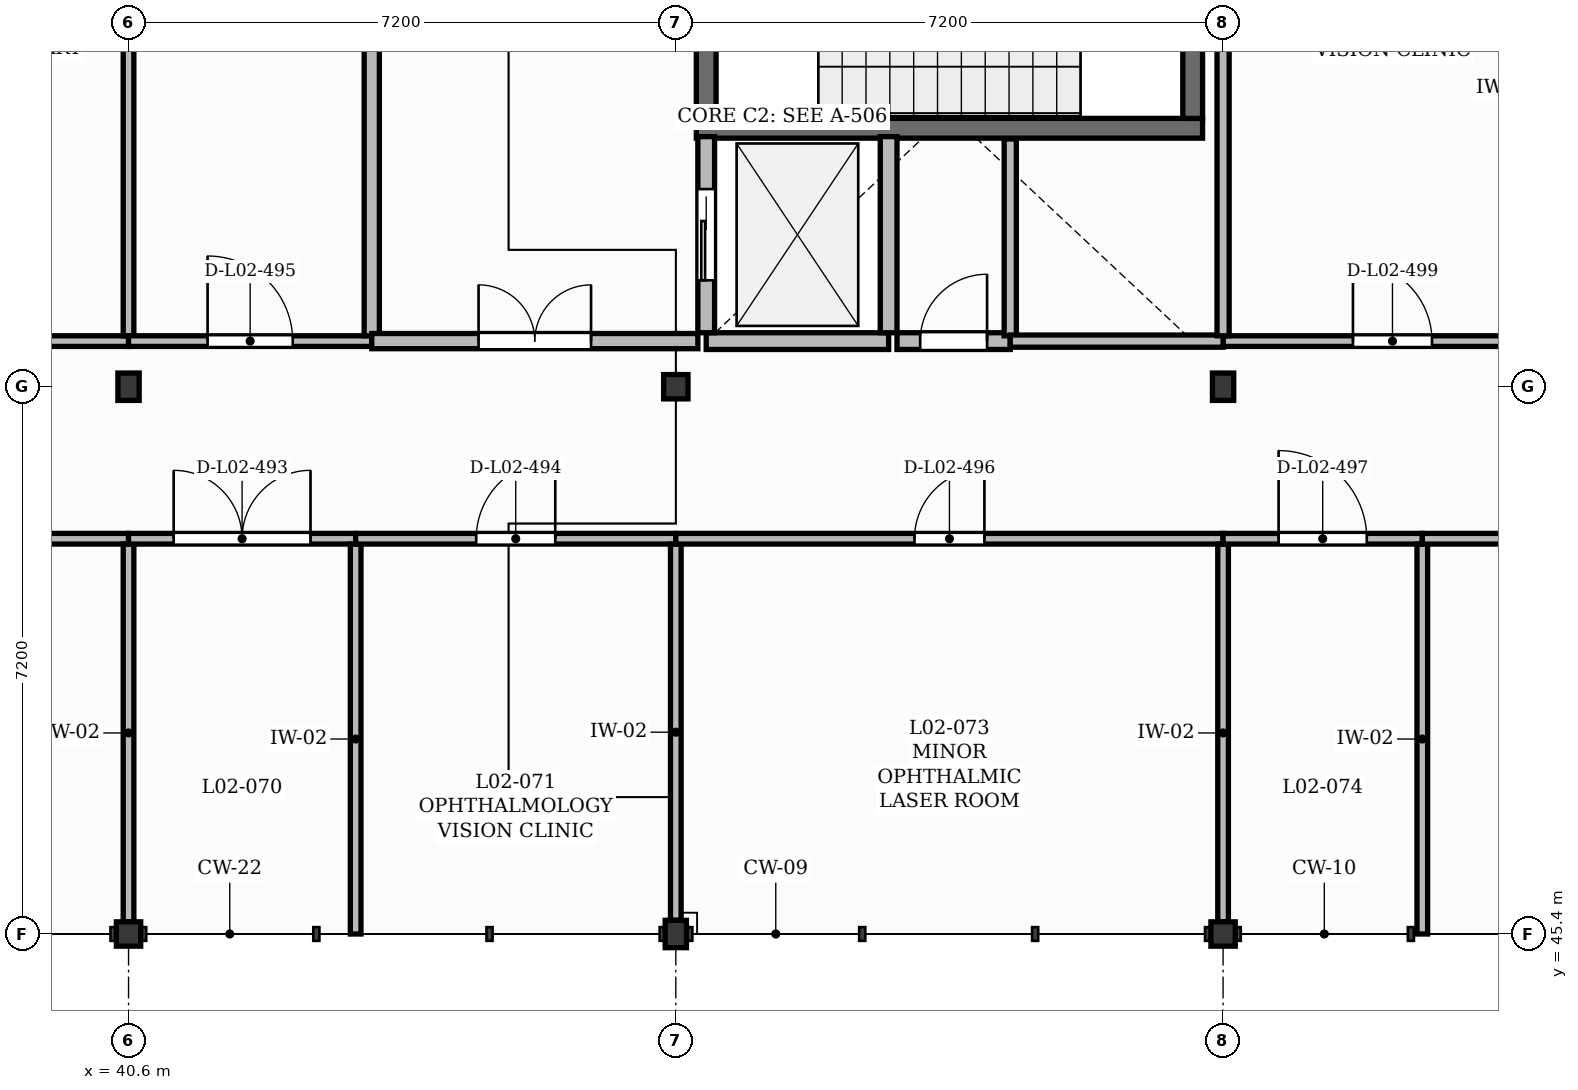
"""IFC4 building model, lengths in metres.
Left out: names, types, materials, properties, quantities, classifications, styles, units other than length and angle.
Written with IfcOpenShell. Run it as: python <this file> out.ifc"""

import sys

from ifc_helpers import new_model, si_unit, direction, frame, frame_2d, origin, origin_2d, place, context, subcontext, project, spatial, rectangle, extrude, element, fill, save


model = new_model("IFC4")
c1 = context("Model", 3, precision=1e-05, world=origin(), true_north=direction((0.0, 1.0)))
c2 = subcontext(c1, "Body", "Model", "MODEL_VIEW")
j1 = project(units=[si_unit("LENGTHUNIT", "METRE"), si_unit("PLANEANGLEUNIT", "RADIAN")], contexts=[c1])
p1 = place(None, origin())
s1 = spatial("IfcSite", under=j1, at=p1, CompositionType="ELEMENT")
p2 = place(p1, origin())
s2 = spatial("IfcBuilding", under=s1, at=p2, CompositionType="ELEMENT")
p3 = place(p2, frame((0.0, 0.0, 9.0)))
s3 = spatial("IfcBuildingStorey", under=s2, at=p3, CompositionType="ELEMENT", Elevation=9.0)
p4 = place(p3, frame((40.6, 45.4, 0.0), z_axis=(0.0, 0.0, 1.0), x_axis=(1.0, 0.0, 0.0)))
e1 = element("IfcColumn", 1, at=p4, inside=s3, PredefinedType="COLUMN", context=c2, shape_type="SweptSolid", body=[
    extrude(rectangle(XDim=0.32, YDim=0.32, at=origin_2d()), origin(), (0.0, 0.0, 1.0), 3.99),
])
for number, where, z_axis, x_axis in (
    (2, (40.6, 52.6, 0.0), (0.0, 0.0, 1.0), (1.0, 0.0, 0.0)),
    (3, (47.8, 45.4, 0.0), (0.0, 0.0, 1.0), (1.0, 0.0, 0.0)),
):
    element("IfcColumn", number, at=place(p3, frame(where, z_axis=z_axis, x_axis=x_axis)), inside=s3, PredefinedType="COLUMN", context=c2, shape_type="SweptSolid", body=[
        extrude(rectangle(XDim=0.28, YDim=0.36, at=origin_2d()), origin(), (0.0, 0.0, 1.0), 3.99),
    ])
for number, where, z_axis, x_axis in (
    (4, (47.8, 52.6, 0.0), (0.0, 0.0, 1.0), (1.0, 0.0, 0.0)),
    (5, (55.0, 45.4, 0.0), (0.0, 0.0, 1.0), (1.0, 0.0, 0.0)),
):
    element("IfcColumn", number, at=place(p3, frame(where, z_axis=z_axis, x_axis=x_axis)), inside=s3, PredefinedType="COLUMN", context=c2, shape_type="SweptSolid", body=[
        extrude(rectangle(XDim=0.32, YDim=0.32, at=origin_2d()), origin(), (0.0, 0.0, 1.0), 3.99),
    ])
p5 = place(p3, frame((55.0, 52.6, 0.0), z_axis=(0.0, 0.0, 1.0), x_axis=(1.0, 0.0, 0.0)))
e6 = element("IfcColumn", 6, at=p5, inside=s3, PredefinedType="COLUMN", context=c2, shape_type="SweptSolid", body=[
    extrude(rectangle(XDim=0.28, YDim=0.36, at=origin_2d()), origin(), (0.0, 0.0, 1.0), 3.99),
])
p6 = place(p3, frame((48.07, 56.0, 0.0), z_axis=(0.0, 0.0, 1.0), x_axis=(1.0, 0.0, 0.0)))
e7 = element("IfcWall", 7, at=p6, inside=s3, PredefinedType="SHEAR", context=c2, shape_type="SweptSolid", body=[
    extrude(rectangle(XDim=6.66, YDim=0.26, at=frame_2d((3.33, 0.0))), origin(), (0.0, 0.0, 1.0), 3.95),
])
p7 = place(p3, frame((48.2, 56.13, 0.0), z_axis=(0.0, 0.0, 1.0), x_axis=(0.0, 1.0, 0.0)))
e8 = element("IfcWall", 8, at=p7, inside=s3, PredefinedType="SHEAR", context=c2, shape_type="SweptSolid", body=[
    extrude(rectangle(XDim=2.94, YDim=0.26, at=frame_2d((1.47, 0.0))), origin(), (0.0, 0.0, 1.0), 3.95),
])
p8 = place(p7, frame((0.91, 0.0, 0.0)))
e9 = element("IfcOpeningElement", 9, at=p8, cuts=e8, PredefinedType="OPENING", context=c2, shape_type="SweptSolid", body=[
    extrude(rectangle(XDim=1.12, YDim=2.1, at=frame_2d((0.56, 1.05))), frame((0.0, 0.14, 0.0), z_axis=(0.0, -1.0, 0.0), x_axis=(1.0, 0.0, 0.0)), (0.0, 0.0, 1.0), 0.28),
])
p9 = place(p3, frame((54.6, 56.13, 0.0), z_axis=(0.0, 0.0, 1.0), x_axis=(0.0, 1.0, 0.0)))
e10 = element("IfcWall", 10, at=p9, inside=s3, PredefinedType="SHEAR", context=c2, shape_type="SweptSolid", body=[
    extrude(rectangle(XDim=2.94, YDim=0.26, at=frame_2d((1.47, 0.0))), origin(), (0.0, 0.0, 1.0), 3.95),
])
p10 = place(p3, frame((48.2, 53.2, 0.0), z_axis=(0.0, 0.0, 1.0), x_axis=(1.0, 0.0, 0.0)))
e11 = element("IfcWall", 11, at=p10, inside=s3, PredefinedType="SOLIDWALL", context=c2, shape_type="SweptSolid", body=[
    extrude(rectangle(XDim=2.4, YDim=0.22, at=frame_2d((1.2, 0.0))), origin(), (0.0, 0.0, 1.0), 3.95),
])
p11 = place(p3, frame((48.2, 53.31, 0.0), z_axis=(0.0, 0.0, 1.0), x_axis=(0.0, 1.0, 0.0)))
e12 = element("IfcWall", 12, at=p11, inside=s3, PredefinedType="SOLIDWALL", context=c2, shape_type="SweptSolid", body=[
    extrude(rectangle(XDim=2.58, YDim=0.22, at=frame_2d((1.29, 0.0))), origin(), (0.0, 0.0, 1.0), 3.95),
])
p12 = place(p11, frame((0.69, 0.0, 0.0)))
e13 = element("IfcOpeningElement", 13, at=p12, cuts=e12, PredefinedType="OPENING", context=c2, shape_type="SweptSolid", body=[
    extrude(rectangle(XDim=1.2, YDim=2.15, at=frame_2d((0.6, 1.075))), frame((0.0, 0.12, 0.0), z_axis=(0.0, -1.0, 0.0), x_axis=(1.0, 0.0, 0.0)), (0.0, 0.0, 1.0), 0.24),
])
p13 = place(p3, frame((50.6, 53.31, 0.0), z_axis=(0.0, 0.0, 1.0), x_axis=(0.0, 1.0, 0.0)))
e14 = element("IfcWall", 14, at=p13, inside=s3, PredefinedType="SOLIDWALL", context=c2, shape_type="SweptSolid", body=[
    extrude(rectangle(XDim=2.58, YDim=0.22, at=frame_2d((1.29, 0.0))), origin(), (0.0, 0.0, 1.0), 3.95),
])
p14 = place(p3, frame((33.4, 50.6, 0.0), z_axis=(0.0, 0.0, 1.0), x_axis=(1.0, 0.0, 0.0)))
e15 = element("IfcWall", 15, at=p14, inside=s3, PredefinedType="PARTITIONING", context=c2, shape_type="SweptSolid", body=[
    extrude(rectangle(XDim=7.2, YDim=0.14, at=frame_2d((3.6, 0.0))), origin(), (0.0, 0.0, 1.0), 3.96),
])
p15 = place(p14, frame((3.04, 0.0, 0.0)))
e16 = element("IfcOpeningElement", 16, at=p15, cuts=e15, PredefinedType="OPENING", context=c2, shape_type="SweptSolid", body=[
    extrude(rectangle(XDim=1.12, YDim=2.15, at=frame_2d((0.56, 1.075))), frame((0.0, 0.08, 0.0), z_axis=(0.0, -1.0, 0.0), x_axis=(1.0, 0.0, 0.0)), (0.0, 0.0, 1.0), 0.16),
])
p16 = place(p3, frame((36.51, 53.2, 0.0), z_axis=(0.0, 0.0, 1.0), x_axis=(1.0, 0.0, 0.0)))
e17 = element("IfcWall", 17, at=p16, inside=s3, PredefinedType="PARTITIONING", context=c2, shape_type="SweptSolid", body=[
    extrude(rectangle(XDim=4.09, YDim=0.14, at=frame_2d((2.045, 0.0))), origin(), (0.0, 0.0, 1.0), 3.96),
])
p17 = place(p16, frame((1.465, 0.0, 0.0)))
e18 = element("IfcOpeningElement", 18, at=p17, cuts=e17, PredefinedType="OPENING", context=c2, shape_type="SweptSolid", body=[
    extrude(rectangle(XDim=1.16, YDim=2.1, at=frame_2d((0.58, 1.05))), frame((0.0, 0.08, 0.0), z_axis=(0.0, -1.0, 0.0), x_axis=(1.0, 0.0, 0.0)), (0.0, 0.0, 1.0), 0.16),
])
p18 = place(p3, frame((40.6, 45.56, 0.0), z_axis=(0.0, 0.0, 1.0), x_axis=(0.0, 1.0, 0.0)))
e19 = element("IfcWall", 19, at=p18, inside=s3, PredefinedType="PARTITIONING", context=c2, shape_type="SweptSolid", body=[
    extrude(rectangle(XDim=4.97, YDim=0.14, at=frame_2d((2.485, 0.0))), origin(), (0.0, 0.0, 1.0), 3.47),
])
p19 = place(p3, frame((40.6, 50.6, 0.0), z_axis=(0.0, 0.0, 1.0), x_axis=(1.0, 0.0, 0.0)))
e20 = element("IfcWall", 20, at=p19, inside=s3, PredefinedType="PARTITIONING", context=c2, shape_type="SweptSolid", body=[
    extrude(rectangle(XDim=2.988, YDim=0.14, at=frame_2d((1.494, 0.0))), origin(), (0.0, 0.0, 1.0), 3.96),
])
p20 = place(p19, frame((0.594, 0.0, 0.0)))
e21 = element("IfcOpeningElement", 21, at=p20, cuts=e20, PredefinedType="OPENING", context=c2, shape_type="SweptSolid", body=[
    extrude(rectangle(XDim=1.8, YDim=2.3, at=frame_2d((0.9, 1.15))), frame((0.0, 0.08, 0.0), z_axis=(0.0, -1.0, 0.0), x_axis=(1.0, 0.0, 0.0)), (0.0, 0.0, 1.0), 0.16),
])
p21 = place(p3, frame((40.6, 53.27, 0.0), z_axis=(0.0, 0.0, 1.0), x_axis=(0.0, 1.0, 0.0)))
e22 = element("IfcWall", 22, at=p21, inside=s3, PredefinedType="PARTITIONING", context=c2, shape_type="SweptSolid", body=[
    extrude(rectangle(XDim=6.37, YDim=0.14, at=frame_2d((3.185, 0.0))), origin(), (0.0, 0.0, 1.0), 3.47),
])
p22 = place(p3, frame((40.6, 53.2, 0.0), z_axis=(0.0, 0.0, 1.0), x_axis=(1.0, 0.0, 0.0)))
e23 = element("IfcWall", 23, at=p22, inside=s3, PredefinedType="PARTITIONING", context=c2, shape_type="SweptSolid", body=[
    extrude(rectangle(XDim=3.2, YDim=0.14, at=frame_2d((1.6, 0.0))), origin(), (0.0, 0.0, 1.0), 3.96),
])
p23 = place(p22, frame((1.04, 0.0, 0.0)))
e24 = element("IfcOpeningElement", 24, at=p23, cuts=e23, PredefinedType="OPENING", context=c2, shape_type="SweptSolid", body=[
    extrude(rectangle(XDim=1.12, YDim=2.15, at=frame_2d((0.56, 1.075))), frame((0.0, 0.08, 0.0), z_axis=(0.0, -1.0, 0.0), x_axis=(1.0, 0.0, 0.0)), (0.0, 0.0, 1.0), 0.16),
])
p24 = place(p3, frame((43.588, 45.4, 0.0), z_axis=(0.0, 0.0, 1.0), x_axis=(0.0, 1.0, 0.0)))
e25 = element("IfcWall", 25, at=p24, inside=s3, PredefinedType="PARTITIONING", context=c2, shape_type="SweptSolid", body=[
    extrude(rectangle(XDim=5.13, YDim=0.14, at=frame_2d((2.565, 0.0))), origin(), (0.0, 0.0, 1.0), 3.96),
])
p25 = place(p3, frame((43.588, 50.6, 0.0), z_axis=(0.0, 0.0, 1.0), x_axis=(1.0, 0.0, 0.0)))
e26 = element("IfcWall", 26, at=p25, inside=s3, PredefinedType="PARTITIONING", context=c2, shape_type="SweptSolid", body=[
    extrude(rectangle(XDim=4.212, YDim=0.14, at=frame_2d((2.106, 0.0))), origin(), (0.0, 0.0, 1.0), 3.96),
])
p26 = place(p25, frame((1.586, 0.0, 0.0)))
e27 = element("IfcOpeningElement", 27, at=p26, cuts=e26, PredefinedType="OPENING", context=c2, shape_type="SweptSolid", body=[
    extrude(rectangle(XDim=1.04, YDim=2.1, at=frame_2d((0.52, 1.05))), frame((0.0, 0.08, 0.0), z_axis=(0.0, -1.0, 0.0), x_axis=(1.0, 0.0, 0.0)), (0.0, 0.0, 1.0), 0.16),
])
p27 = place(p3, frame((43.8, 53.27, 0.0), z_axis=(0.0, 0.0, 1.0), x_axis=(0.0, 1.0, 0.0)))
e28 = element("IfcWall", 28, at=p27, inside=s3, PredefinedType="PARTITIONING", context=c2, shape_type="SweptSolid", body=[
    extrude(rectangle(XDim=5.33, YDim=0.2, at=frame_2d((2.665, 0.0))), origin(), (0.0, 0.0, 1.0), 3.96),
])
p28 = place(p3, frame((43.8, 53.2, 0.0), z_axis=(0.0, 0.0, 1.0), x_axis=(1.0, 0.0, 0.0)))
e29 = element("IfcWall", 29, at=p28, inside=s3, PredefinedType="PARTITIONING", context=c2, shape_type="SweptSolid", body=[
    extrude(rectangle(XDim=4.29, YDim=0.2, at=frame_2d((2.145, 0.0))), origin(), (0.0, 0.0, 1.0), 3.96),
])
p29 = place(p28, frame((1.405, 0.0, 0.0)))
e30 = element("IfcOpeningElement", 30, at=p29, cuts=e29, PredefinedType="OPENING", context=c2, shape_type="SweptSolid", body=[
    extrude(rectangle(XDim=1.48, YDim=2.25, at=frame_2d((0.74, 1.125))), frame((0.0, 0.11, 0.0), z_axis=(0.0, -1.0, 0.0), x_axis=(1.0, 0.0, 0.0)), (0.0, 0.0, 1.0), 0.22),
])
p30 = place(p3, frame((47.8, 45.58, 0.0), z_axis=(0.0, 0.0, 1.0), x_axis=(0.0, 1.0, 0.0)))
e31 = element("IfcWall", 31, at=p30, inside=s3, PredefinedType="PARTITIONING", context=c2, shape_type="SweptSolid", body=[
    extrude(rectangle(XDim=4.95, YDim=0.14, at=frame_2d((2.475, 0.0))), origin(), (0.0, 0.0, 1.0), 3.47),
])
p31 = place(p3, frame((47.8, 50.6, 0.0), z_axis=(0.0, 0.0, 1.0), x_axis=(1.0, 0.0, 0.0)))
e32 = element("IfcWall", 32, at=p31, inside=s3, PredefinedType="PARTITIONING", context=c2, shape_type="SweptSolid", body=[
    extrude(rectangle(XDim=7.2, YDim=0.14, at=frame_2d((3.6, 0.0))), origin(), (0.0, 0.0, 1.0), 3.96),
])
p32 = place(p31, frame((3.14, 0.0, 0.0)))
e33 = element("IfcOpeningElement", 33, at=p32, cuts=e32, PredefinedType="OPENING", context=c2, shape_type="SweptSolid", body=[
    extrude(rectangle(XDim=0.92, YDim=2.1, at=frame_2d((0.46, 1.05))), frame((0.0, 0.08, 0.0), z_axis=(0.0, -1.0, 0.0), x_axis=(1.0, 0.0, 0.0)), (0.0, 0.0, 1.0), 0.16),
])
p33 = place(p3, frame((50.71, 53.2, 0.0), z_axis=(0.0, 0.0, 1.0), x_axis=(1.0, 0.0, 0.0)))
e34 = element("IfcWall", 34, at=p33, inside=s3, PredefinedType="SOLIDWALL", context=c2, shape_type="SweptSolid", body=[
    extrude(rectangle(XDim=1.49, YDim=0.22, at=frame_2d((0.745, 0.0))), origin(), (0.0, 0.0, 1.0), 3.96),
])
p34 = place(p33, frame((0.305, 0.0, 0.0)))
e35 = element("IfcOpeningElement", 35, at=p34, cuts=e34, PredefinedType="OPENING", context=c2, shape_type="SweptSolid", body=[
    extrude(rectangle(XDim=0.88, YDim=2.05, at=frame_2d((0.44, 1.025))), frame((0.0, 0.12, 0.0), z_axis=(0.0, -1.0, 0.0), x_axis=(1.0, 0.0, 0.0)), (0.0, 0.0, 1.0), 0.24),
])
p35 = place(p3, frame((55.0, 45.56, 0.0), z_axis=(0.0, 0.0, 1.0), x_axis=(0.0, 1.0, 0.0)))
e36 = element("IfcWall", 36, at=p35, inside=s3, PredefinedType="PARTITIONING", context=c2, shape_type="SweptSolid", body=[
    extrude(rectangle(XDim=4.97, YDim=0.14, at=frame_2d((2.485, 0.0))), origin(), (0.0, 0.0, 1.0), 3.47),
])
p36 = place(p3, frame((55.0, 50.6, 0.0), z_axis=(0.0, 0.0, 1.0), x_axis=(1.0, 0.0, 0.0)))
e37 = element("IfcWall", 37, at=p36, inside=s3, PredefinedType="PARTITIONING", context=c2, shape_type="SweptSolid", body=[
    extrude(rectangle(XDim=2.621, YDim=0.14, at=frame_2d((1.311, 0.0))), origin(), (0.0, 0.0, 1.0), 3.96),
])
p37 = place(p36, frame((0.73, 0.0, 0.0)))
e38 = element("IfcOpeningElement", 38, at=p37, cuts=e37, PredefinedType="OPENING", context=c2, shape_type="SweptSolid", body=[
    extrude(rectangle(XDim=1.16, YDim=2.1, at=frame_2d((0.58, 1.05))), frame((0.0, 0.08, 0.0), z_axis=(0.0, -1.0, 0.0), x_axis=(1.0, 0.0, 0.0)), (0.0, 0.0, 1.0), 0.16),
])
p38 = place(p3, frame((55.0, 53.2, 0.0), z_axis=(0.0, 0.0, 1.0), x_axis=(1.0, 0.0, 0.0)))
e39 = element("IfcWall", 39, at=p38, inside=s3, PredefinedType="PARTITIONING", context=c2, shape_type="SweptSolid", body=[
    extrude(rectangle(XDim=4.457, YDim=0.14, at=frame_2d((2.229, 0.0))), origin(), (0.0, 0.0, 1.0), 3.96),
])
p39 = place(p38, frame((1.708, 0.0, 0.0)))
e40 = element("IfcOpeningElement", 40, at=p39, cuts=e39, PredefinedType="OPENING", context=c2, shape_type="SweptSolid", body=[
    extrude(rectangle(XDim=1.04, YDim=2.1, at=frame_2d((0.52, 1.05))), frame((0.0, 0.08, 0.0), z_axis=(0.0, -1.0, 0.0), x_axis=(1.0, 0.0, 0.0)), (0.0, 0.0, 1.0), 0.16),
])
p40 = place(p3, frame((57.621, 45.4, 0.0), z_axis=(0.0, 0.0, 1.0), x_axis=(0.0, 1.0, 0.0)))
e41 = element("IfcWall", 41, at=p40, inside=s3, PredefinedType="PARTITIONING", context=c2, shape_type="SweptSolid", body=[
    extrude(rectangle(XDim=5.13, YDim=0.14, at=frame_2d((2.565, 0.0))), origin(), (0.0, 0.0, 1.0), 3.96),
])
p41 = place(p3, frame((57.621, 50.6, 0.0), z_axis=(0.0, 0.0, 1.0), x_axis=(1.0, 0.0, 0.0)))
e42 = element("IfcWall", 42, at=p41, inside=s3, PredefinedType="PARTITIONING", context=c2, shape_type="SweptSolid", body=[
    extrude(rectangle(XDim=4.579, YDim=0.14, at=frame_2d((2.29, 0.0))), origin(), (0.0, 0.0, 1.0), 3.96),
])
p42 = place(p41, frame((1.389, 0.0, 0.0)))
e43 = element("IfcOpeningElement", 43, at=p42, cuts=e42, PredefinedType="OPENING", context=c2, shape_type="SweptSolid", body=[
    extrude(rectangle(XDim=1.8, YDim=2.3, at=frame_2d((0.9, 1.15))), frame((0.0, 0.08, 0.0), z_axis=(0.0, -1.0, 0.0), x_axis=(1.0, 0.0, 0.0)), (0.0, 0.0, 1.0), 0.16),
])
p43 = place(p3, frame((52.2, 53.27, 0.0), z_axis=(0.0, 0.0, 1.0), x_axis=(0.0, 1.0, 0.0)))
e44 = element("IfcWall", 44, at=p43, inside=s3, PredefinedType="PARTITIONING", context=c2, shape_type="SweptSolid", body=[
    extrude(rectangle(XDim=2.59, YDim=0.16, at=frame_2d((1.295, 0.0))), origin(), (0.0, 0.0, 1.0), 3.96),
])
p44 = place(p3, frame((55.0, 53.2, 0.0), z_axis=(0.0, 0.0, 1.0), x_axis=(-1.0, 0.0, 0.0)))
e45 = element("IfcWall", 45, at=p44, inside=s3, PredefinedType="PARTITIONING", context=c2, shape_type="SweptSolid", body=[
    extrude(rectangle(XDim=2.8, YDim=0.16, at=frame_2d((1.4, 0.0))), origin(), (0.0, 0.0, 1.0), 3.96),
])
p45 = place(p3, frame((55.0, 53.27, 0.0), z_axis=(0.0, 0.0, 1.0), x_axis=(0.0, 1.0, 0.0)))
e46 = element("IfcWall", 46, at=p45, inside=s3, PredefinedType="PARTITIONING", context=c2, shape_type="SweptSolid", body=[
    extrude(rectangle(XDim=6.37, YDim=0.16, at=frame_2d((3.185, 0.0))), origin(), (0.0, 0.0, 1.0), 3.47),
])
p46 = place(p12, origin())
e47 = element("IfcDoor", 47, at=p46, inside=s3, OperationType="SLIDING_TO_LEFT", PredefinedType="DOOR", context=c2, shape_type="SweptSolid", body=[
    extrude(rectangle(XDim=1.2, YDim=2.15, at=frame_2d((0.6, 1.075))), frame((0.0, 0.025, 0.0), z_axis=(0.0, -1.0, 0.0), x_axis=(1.0, 0.0, 0.0)), (0.0, 0.0, 1.0), 0.05),
])
fill(e13, e47)
p47 = place(p29, origin())
e48 = element("IfcDoor", 48, at=p47, inside=s3, OperationType="DOUBLE_DOOR_SINGLE_SWING", PredefinedType="DOOR", context=c2, shape_type="SweptSolid", body=[
    extrude(rectangle(XDim=1.48, YDim=2.25, at=frame_2d((0.74, 1.125))), frame((0.0, 0.025, 0.0), z_axis=(0.0, -1.0, 0.0), x_axis=(1.0, 0.0, 0.0)), (0.0, 0.0, 1.0), 0.05),
])
fill(e30, e48)
p48 = place(p34, origin())
e49 = element("IfcDoor", 49, at=p48, inside=s3, OperationType="SINGLE_SWING_RIGHT", PredefinedType="DOOR", context=c2, shape_type="SweptSolid", body=[
    extrude(rectangle(XDim=0.88, YDim=2.05, at=frame_2d((0.44, 1.025))), frame((0.0, 0.025, 0.0), z_axis=(0.0, -1.0, 0.0), x_axis=(1.0, 0.0, 0.0)), (0.0, 0.0, 1.0), 0.05),
])
fill(e35, e49)
p49 = place(p20, origin())
e50 = element("IfcDoor", 50, at=p49, inside=s3, OperationType="DOUBLE_DOOR_SINGLE_SWING", PredefinedType="DOOR", context=c2, shape_type="SweptSolid", body=[
    extrude(rectangle(XDim=1.8, YDim=2.3, at=frame_2d((0.9, 1.15))), frame((0.0, 0.025, 0.0), z_axis=(0.0, -1.0, 0.0), x_axis=(1.0, 0.0, 0.0)), (0.0, 0.0, 1.0), 0.05),
])
fill(e21, e50)
p50 = place(p26, origin())
e51 = element("IfcDoor", 51, at=p50, inside=s3, OperationType="SINGLE_SWING_RIGHT", PredefinedType="DOOR", context=c2, shape_type="SweptSolid", body=[
    extrude(rectangle(XDim=1.04, YDim=2.1, at=frame_2d((0.52, 1.05))), frame((0.0, 0.025, 0.0), z_axis=(0.0, -1.0, 0.0), x_axis=(1.0, 0.0, 0.0)), (0.0, 0.0, 1.0), 0.05),
])
fill(e27, e51)
p51 = place(p23, origin())
e52 = element("IfcDoor", 52, at=p51, inside=s3, OperationType="SINGLE_SWING_LEFT", PredefinedType="DOOR", context=c2, shape_type="SweptSolid", body=[
    extrude(rectangle(XDim=1.12, YDim=2.15, at=frame_2d((0.56, 1.075))), frame((0.0, 0.025, 0.0), z_axis=(0.0, -1.0, 0.0), x_axis=(1.0, 0.0, 0.0)), (0.0, 0.0, 1.0), 0.05),
])
fill(e24, e52)
p52 = place(p32, origin())
e53 = element("IfcDoor", 53, at=p52, inside=s3, OperationType="SINGLE_SWING_RIGHT", PredefinedType="DOOR", context=c2, shape_type="SweptSolid", body=[
    extrude(rectangle(XDim=0.92, YDim=2.1, at=frame_2d((0.46, 1.05))), frame((0.0, 0.025, 0.0), z_axis=(0.0, -1.0, 0.0), x_axis=(1.0, 0.0, 0.0)), (0.0, 0.0, 1.0), 0.05),
])
fill(e33, e53)
p53 = place(p37, origin())
e54 = element("IfcDoor", 54, at=p53, inside=s3, OperationType="SINGLE_SWING_LEFT", PredefinedType="DOOR", context=c2, shape_type="SweptSolid", body=[
    extrude(rectangle(XDim=1.16, YDim=2.1, at=frame_2d((0.58, 1.05))), frame((0.0, 0.025, 0.0), z_axis=(0.0, -1.0, 0.0), x_axis=(1.0, 0.0, 0.0)), (0.0, 0.0, 1.0), 0.05),
])
fill(e38, e54)
p54 = place(p39, origin())
e55 = element("IfcDoor", 55, at=p54, inside=s3, OperationType="SINGLE_SWING_LEFT", PredefinedType="DOOR", context=c2, shape_type="SweptSolid", body=[
    extrude(rectangle(XDim=1.04, YDim=2.1, at=frame_2d((0.52, 1.05))), frame((0.0, 0.025, 0.0), z_axis=(0.0, -1.0, 0.0), x_axis=(1.0, 0.0, 0.0)), (0.0, 0.0, 1.0), 0.05),
])
fill(e40, e55)
save(model, sys.argv[1])
